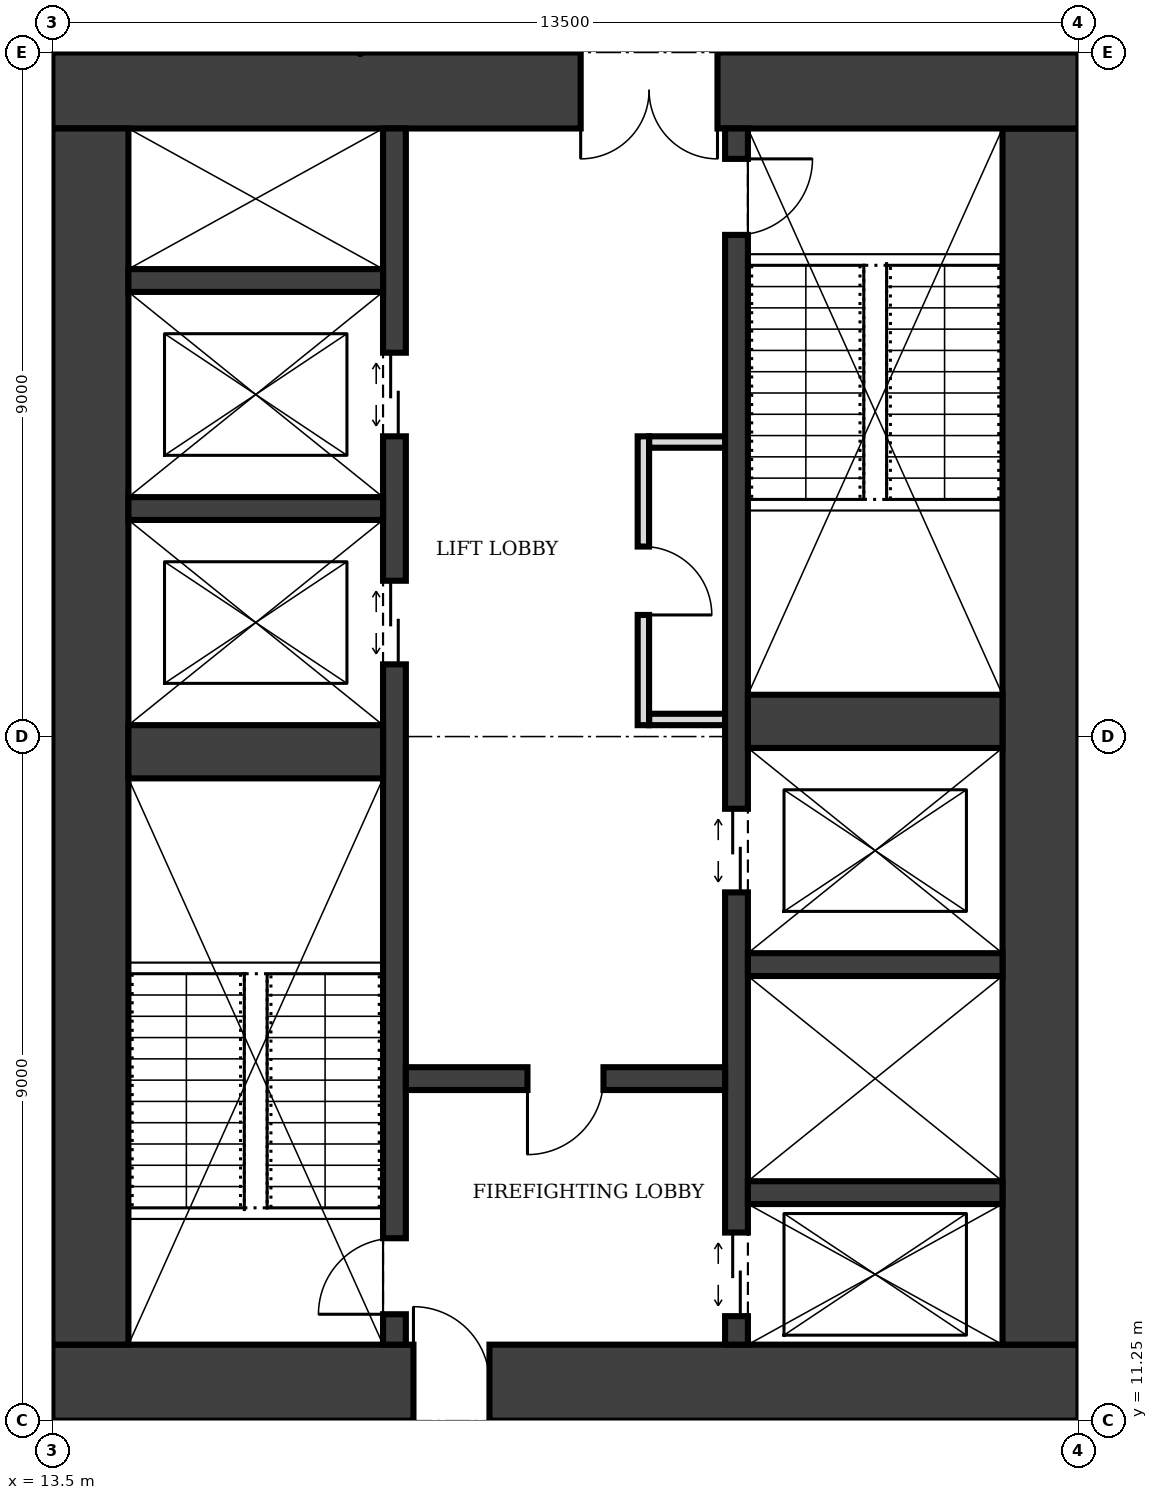
"""IFC4 building model, lengths in metres.
Left out: names, types, materials, properties, quantities, classifications, styles, units other than length and angle.
Written with IfcOpenShell. Run it as: python <this file> out.ifc"""

import sys

from ifc_helpers import new_model, si_unit, direction, frame, frame_2d, origin, place, context, subcontext, project, spatial, rectangle, extrude, element, fill, save


model = new_model("IFC4")
c1 = context("Model", 3, precision=1e-05, world=origin(), true_north=direction((0.0, 1.0)))
c2 = subcontext(c1, "Body", "Model", "MODEL_VIEW")
j1 = project(units=[si_unit("LENGTHUNIT", "METRE"), si_unit("PLANEANGLEUNIT", "RADIAN")], contexts=[c1])
p1 = place(None, origin())
s1 = spatial("IfcSite", under=j1, at=p1, CompositionType="ELEMENT")
p2 = place(p1, origin())
s2 = spatial("IfcBuilding", under=s1, at=p2, CompositionType="ELEMENT")
p3 = place(p2, frame((0.0, 0.0, 69.0)))
s3 = spatial("IfcBuildingStorey", under=s2, at=p3, CompositionType="ELEMENT", Elevation=69.0)
p4 = place(p3, frame((13.5, 11.75, 0.0), z_axis=(0.0, 0.0, 1.0), x_axis=(1.0, 0.0, 0.0)))
e1 = element("IfcWall", 1, at=p4, inside=s3, PredefinedType="SHEAR", context=c2, shape_type="SweptSolid", body=[
    extrude(rectangle(XDim=13.5, YDim=1.0, at=frame_2d((6.75, 0.0))), origin(), (0.0, 0.0, 1.0), 4.0),
])
p5 = place(p4, frame((4.75, 0.0, 0.0)))
e2 = element("IfcOpeningElement", 2, at=p5, cuts=e1, PredefinedType="OPENING", context=c2, shape_type="SweptSolid", body=[
    extrude(rectangle(XDim=1.0, YDim=2.1, at=frame_2d((0.5, 1.05))), frame((0.0, 0.51, 0.0), z_axis=(0.0, -1.0, 0.0), x_axis=(1.0, 0.0, 0.0)), (0.0, 0.0, 1.0), 1.02),
])
p6 = place(p3, frame((26.5, 12.25, 0.0), z_axis=(0.0, 0.0, 1.0), x_axis=(0.0, 1.0, 0.0)))
e3 = element("IfcWall", 3, at=p6, inside=s3, PredefinedType="SHEAR", context=c2, shape_type="SweptSolid", body=[
    extrude(rectangle(XDim=16.0, YDim=1.0, at=frame_2d((8.0, 0.0))), origin(), (0.0, 0.0, 1.0), 4.0),
])
p7 = place(p3, frame((27.0, 28.75, 0.0), z_axis=(0.0, 0.0, 1.0), x_axis=(-1.0, 0.0, 0.0)))
e4 = element("IfcWall", 4, at=p7, inside=s3, PredefinedType="SHEAR", context=c2, shape_type="SweptSolid", body=[
    extrude(rectangle(XDim=13.5, YDim=1.0, at=frame_2d((6.75, 0.0))), origin(), (0.0, 0.0, 1.0), 4.0),
])
p8 = place(p7, frame((4.75, 0.0, 0.0)))
e5 = element("IfcOpeningElement", 5, at=p8, cuts=e4, PredefinedType="OPENING", context=c2, shape_type="SweptSolid", body=[
    extrude(rectangle(XDim=1.8, YDim=2.1, at=frame_2d((0.9, 1.05))), frame((0.0, 0.51, 0.0), z_axis=(0.0, -1.0, 0.0), x_axis=(1.0, 0.0, 0.0)), (0.0, 0.0, 1.0), 1.02),
])
p9 = place(p3, frame((14.0, 28.25, 0.0), z_axis=(0.0, 0.0, 1.0), x_axis=(0.0, -1.0, 0.0)))
e6 = element("IfcWall", 6, at=p9, inside=s3, PredefinedType="SHEAR", context=c2, shape_type="SweptSolid", body=[
    extrude(rectangle(XDim=16.0, YDim=1.0, at=frame_2d((8.0, 0.0))), origin(), (0.0, 0.0, 1.0), 4.0),
])
p10 = place(p3, frame((18.0, 12.25, 0.0), z_axis=(0.0, 0.0, 1.0), x_axis=(0.0, 1.0, 0.0)))
e7 = element("IfcWall", 7, at=p10, inside=s3, PredefinedType="SHEAR", context=c2, shape_type="SweptSolid", body=[
    extrude(rectangle(XDim=16.0, YDim=0.3, at=frame_2d((8.0, 0.0))), origin(), (0.0, 0.0, 1.0), 4.0),
])
p11 = place(p10, frame((0.4, 0.0, 0.0)))
e8 = element("IfcOpeningElement", 8, at=p11, cuts=e7, PredefinedType="OPENING", context=c2, shape_type="SweptSolid", body=[
    extrude(rectangle(XDim=1.0, YDim=2.1, at=frame_2d((0.5, 1.05))), frame((0.0, 0.16, 0.0), z_axis=(0.0, -1.0, 0.0), x_axis=(1.0, 0.0, 0.0)), (0.0, 0.0, 1.0), 0.32),
])
p12 = place(p10, frame((8.95, 0.0, 0.0)))
e9 = element("IfcOpeningElement", 9, at=p12, cuts=e7, PredefinedType="OPENING", context=c2, shape_type="SweptSolid", body=[
    extrude(rectangle(XDim=1.1, YDim=2.1, at=frame_2d((0.55, 1.05))), frame((0.0, 0.16, 0.0), z_axis=(0.0, -1.0, 0.0), x_axis=(1.0, 0.0, 0.0)), (0.0, 0.0, 1.0), 0.32),
])
p13 = place(p10, frame((11.95, 0.0, 0.0)))
e10 = element("IfcOpeningElement", 10, at=p13, cuts=e7, PredefinedType="OPENING", context=c2, shape_type="SweptSolid", body=[
    extrude(rectangle(XDim=1.1, YDim=2.1, at=frame_2d((0.55, 1.05))), frame((0.0, 0.16, 0.0), z_axis=(0.0, -1.0, 0.0), x_axis=(1.0, 0.0, 0.0)), (0.0, 0.0, 1.0), 0.32),
])
p14 = place(p3, frame((22.5, 12.25, 0.0), z_axis=(0.0, 0.0, 1.0), x_axis=(0.0, 1.0, 0.0)))
e11 = element("IfcWall", 11, at=p14, inside=s3, PredefinedType="SHEAR", context=c2, shape_type="SweptSolid", body=[
    extrude(rectangle(XDim=16.0, YDim=0.3, at=frame_2d((8.0, 0.0))), origin(), (0.0, 0.0, 1.0), 4.0),
])
p15 = place(p14, frame((14.6, 0.0, 0.0)))
e12 = element("IfcOpeningElement", 12, at=p15, cuts=e11, PredefinedType="OPENING", context=c2, shape_type="SweptSolid", body=[
    extrude(rectangle(XDim=1.0, YDim=2.1, at=frame_2d((0.5, 1.05))), frame((0.0, 0.16, 0.0), z_axis=(0.0, -1.0, 0.0), x_axis=(1.0, 0.0, 0.0)), (0.0, 0.0, 1.0), 0.32),
])
p16 = place(p14, frame((0.375, 0.0, 0.0)))
e13 = element("IfcOpeningElement", 13, at=p16, cuts=e11, PredefinedType="OPENING", context=c2, shape_type="SweptSolid", body=[
    extrude(rectangle(XDim=1.1, YDim=2.1, at=frame_2d((0.55, 1.05))), frame((0.0, 0.16, 0.0), z_axis=(0.0, -1.0, 0.0), x_axis=(1.0, 0.0, 0.0)), (0.0, 0.0, 1.0), 0.32),
])
p17 = place(p14, frame((5.95, 0.0, 0.0)))
e14 = element("IfcOpeningElement", 14, at=p17, cuts=e11, PredefinedType="OPENING", context=c2, shape_type="SweptSolid", body=[
    extrude(rectangle(XDim=1.1, YDim=2.1, at=frame_2d((0.55, 1.05))), frame((0.0, 0.16, 0.0), z_axis=(0.0, -1.0, 0.0), x_axis=(1.0, 0.0, 0.0)), (0.0, 0.0, 1.0), 0.32),
])
p18 = place(p3, frame((14.5, 20.05, 0.0), z_axis=(0.0, 0.0, 1.0), x_axis=(1.0, 0.0, 0.0)))
e15 = element("IfcWall", 15, at=p18, inside=s3, PredefinedType="SHEAR", context=c2, shape_type="SweptSolid", body=[
    extrude(rectangle(XDim=3.35, YDim=0.7, at=frame_2d((1.675, 0.0))), origin(), (0.0, 0.0, 1.0), 4.0),
])
p19 = place(p3, frame((18.15, 15.75, 0.0), z_axis=(0.0, 0.0, 1.0), x_axis=(1.0, 0.0, 0.0)))
e16 = element("IfcWall", 16, at=p19, inside=s3, PredefinedType="SHEAR", context=c2, shape_type="SweptSolid", body=[
    extrude(rectangle(XDim=4.2, YDim=0.3, at=frame_2d((2.1, 0.0))), origin(), (0.0, 0.0, 1.0), 4.0),
])
p20 = place(p19, frame((1.6, 0.0, 0.0)))
e17 = element("IfcOpeningElement", 17, at=p20, cuts=e16, PredefinedType="OPENING", context=c2, shape_type="SweptSolid", body=[
    extrude(rectangle(XDim=1.0, YDim=2.1, at=frame_2d((0.5, 1.05))), frame((0.0, 0.16, 0.0), z_axis=(0.0, -1.0, 0.0), x_axis=(1.0, 0.0, 0.0)), (0.0, 0.0, 1.0), 0.32),
])
for number, where, z_axis, x_axis in (
    (18, (22.65, 14.25, 0.0), (0.0, 0.0, 1.0), (1.0, 0.0, 0.0)),
    (19, (22.65, 17.25, 0.0), (0.0, 0.0, 1.0), (1.0, 0.0, 0.0)),
):
    element("IfcWall", number, at=place(p3, frame(where, z_axis=z_axis, x_axis=x_axis)), inside=s3, PredefinedType="SHEAR", context=c2, shape_type="SweptSolid", body=[
        extrude(rectangle(XDim=3.35, YDim=0.3, at=frame_2d((1.675, 0.0))), origin(), (0.0, 0.0, 1.0), 4.0),
    ])
p21 = place(p3, frame((22.65, 20.45, 0.0), z_axis=(0.0, 0.0, 1.0), x_axis=(1.0, 0.0, 0.0)))
e20 = element("IfcWall", 20, at=p21, inside=s3, PredefinedType="SHEAR", context=c2, shape_type="SweptSolid", body=[
    extrude(rectangle(XDim=3.35, YDim=0.7, at=frame_2d((1.675, 0.0))), origin(), (0.0, 0.0, 1.0), 4.0),
])
for number, where, z_axis, x_axis in (
    (21, (14.5, 23.25, 0.0), (0.0, 0.0, 1.0), (1.0, 0.0, 0.0)),
    (22, (14.5, 26.25, 0.0), (0.0, 0.0, 1.0), (1.0, 0.0, 0.0)),
):
    element("IfcWall", number, at=place(p3, frame(where, z_axis=z_axis, x_axis=x_axis)), inside=s3, PredefinedType="SHEAR", context=c2, shape_type="SweptSolid", body=[
        extrude(rectangle(XDim=3.35, YDim=0.3, at=frame_2d((1.675, 0.0))), origin(), (0.0, 0.0, 1.0), 4.0),
    ])
p22 = place(p3, frame((21.275, 20.4, 0.0), z_axis=(0.0, 0.0, 1.0), x_axis=(0.0, 1.0, 0.0)))
e23 = element("IfcWall", 23, at=p22, inside=s3, PredefinedType="PARTITIONING", context=c2, shape_type="SweptSolid", body=[
    extrude(rectangle(XDim=3.8, YDim=0.15, at=frame_2d((1.9, 0.0))), origin(), (0.0, 0.0, 1.0), 3.75),
])
p23 = place(p22, frame((1.45, 0.0, 0.0)))
e24 = element("IfcOpeningElement", 24, at=p23, cuts=e23, PredefinedType="OPENING", context=c2, shape_type="SweptSolid", body=[
    extrude(rectangle(XDim=0.9, YDim=2.1, at=frame_2d((0.45, 1.05))), frame((0.0, 0.085, 0.0), z_axis=(0.0, -1.0, 0.0), x_axis=(1.0, 0.0, 0.0)), (0.0, 0.0, 1.0), 0.17),
])
for number, where, z_axis, x_axis in (
    (25, (21.35, 20.475, 0.0), (0.0, 0.0, 1.0), (1.0, 0.0, 0.0)),
    (26, (21.35, 24.125, 0.0), (0.0, 0.0, 1.0), (1.0, 0.0, 0.0)),
):
    element("IfcWall", number, at=place(p3, frame(where, z_axis=z_axis, x_axis=x_axis)), inside=s3, PredefinedType="PARTITIONING", context=c2, shape_type="SweptSolid", body=[
        extrude(rectangle(XDim=1.0, YDim=0.15, at=frame_2d((0.5, 0.0))), origin(), (0.0, 0.0, 1.0), 3.75),
    ])
p24 = place(p5, origin())
e27 = element("IfcDoor", 27, at=p24, inside=s3, OperationType="SINGLE_SWING_LEFT", PredefinedType="DOOR", context=c2, shape_type="SweptSolid", body=[
    extrude(rectangle(XDim=1.0, YDim=2.1, at=frame_2d((0.5, 1.05))), frame((0.0, 0.025, 0.0), z_axis=(0.0, -1.0, 0.0), x_axis=(1.0, 0.0, 0.0)), (0.0, 0.0, 1.0), 0.05),
])
fill(e2, e27)
p25 = place(p8, origin())
e28 = element("IfcDoor", 28, at=p25, inside=s3, OperationType="DOUBLE_DOOR_SINGLE_SWING", PredefinedType="DOOR", context=c2, shape_type="SweptSolid", body=[
    extrude(rectangle(XDim=1.8, YDim=2.1, at=frame_2d((0.9, 1.05))), frame((0.0, 0.025, 0.0), z_axis=(0.0, -1.0, 0.0), x_axis=(1.0, 0.0, 0.0)), (0.0, 0.0, 1.0), 0.05),
])
fill(e5, e28)
p26 = place(p20, frame((1.0, 0.0, 0.0), z_axis=(0.0, 0.0, 1.0), x_axis=(-1.0, 0.0, 0.0)))
e29 = element("IfcDoor", 29, at=p26, inside=s3, OperationType="SINGLE_SWING_RIGHT", PredefinedType="DOOR", context=c2, shape_type="SweptSolid", body=[
    extrude(rectangle(XDim=1.0, YDim=2.1, at=frame_2d((0.5, 1.05))), frame((0.0, 0.025, 0.0), z_axis=(0.0, -1.0, 0.0), x_axis=(1.0, 0.0, 0.0)), (0.0, 0.0, 1.0), 0.05),
])
fill(e17, e29)
p27 = place(p11, origin())
e30 = element("IfcDoor", 30, at=p27, inside=s3, OperationType="SINGLE_SWING_LEFT", PredefinedType="DOOR", context=c2, shape_type="SweptSolid", body=[
    extrude(rectangle(XDim=1.0, YDim=2.1, at=frame_2d((0.5, 1.05))), frame((0.0, 0.025, 0.0), z_axis=(0.0, -1.0, 0.0), x_axis=(1.0, 0.0, 0.0)), (0.0, 0.0, 1.0), 0.05),
])
fill(e8, e30)
p28 = place(p15, frame((1.0, 0.0, 0.0), z_axis=(0.0, 0.0, 1.0), x_axis=(-1.0, 0.0, 0.0)))
e31 = element("IfcDoor", 31, at=p28, inside=s3, OperationType="SINGLE_SWING_LEFT", PredefinedType="DOOR", context=c2, shape_type="SweptSolid", body=[
    extrude(rectangle(XDim=1.0, YDim=2.1, at=frame_2d((0.5, 1.05))), frame((0.0, 0.025, 0.0), z_axis=(0.0, -1.0, 0.0), x_axis=(1.0, 0.0, 0.0)), (0.0, 0.0, 1.0), 0.05),
])
fill(e12, e31)
p29 = place(p16, origin())
e32 = element("IfcDoor", 32, at=p29, inside=s3, OperationType="DOUBLE_DOOR_SLIDING", PredefinedType="DOOR", context=c2, shape_type="SweptSolid", body=[
    extrude(rectangle(XDim=1.1, YDim=2.1, at=frame_2d((0.55, 1.05))), frame((0.0, 0.025, 0.0), z_axis=(0.0, -1.0, 0.0), x_axis=(1.0, 0.0, 0.0)), (0.0, 0.0, 1.0), 0.05),
])
fill(e13, e32)
p30 = place(p12, origin())
e33 = element("IfcDoor", 33, at=p30, inside=s3, OperationType="DOUBLE_DOOR_SLIDING", PredefinedType="DOOR", context=c2, shape_type="SweptSolid", body=[
    extrude(rectangle(XDim=1.1, YDim=2.1, at=frame_2d((0.55, 1.05))), frame((0.0, 0.025, 0.0), z_axis=(0.0, -1.0, 0.0), x_axis=(1.0, 0.0, 0.0)), (0.0, 0.0, 1.0), 0.05),
])
fill(e9, e33)
p31 = place(p13, origin())
e34 = element("IfcDoor", 34, at=p31, inside=s3, OperationType="DOUBLE_DOOR_SLIDING", PredefinedType="DOOR", context=c2, shape_type="SweptSolid", body=[
    extrude(rectangle(XDim=1.1, YDim=2.1, at=frame_2d((0.55, 1.05))), frame((0.0, 0.025, 0.0), z_axis=(0.0, -1.0, 0.0), x_axis=(1.0, 0.0, 0.0)), (0.0, 0.0, 1.0), 0.05),
])
fill(e10, e34)
p32 = place(p17, origin())
e35 = element("IfcDoor", 35, at=p32, inside=s3, OperationType="DOUBLE_DOOR_SLIDING", PredefinedType="DOOR", context=c2, shape_type="SweptSolid", body=[
    extrude(rectangle(XDim=1.1, YDim=2.1, at=frame_2d((0.55, 1.05))), frame((0.0, 0.025, 0.0), z_axis=(0.0, -1.0, 0.0), x_axis=(1.0, 0.0, 0.0)), (0.0, 0.0, 1.0), 0.05),
])
fill(e14, e35)
p33 = place(p23, frame((0.9, 0.0, 0.0), z_axis=(0.0, 0.0, 1.0), x_axis=(-1.0, 0.0, 0.0)))
e36 = element("IfcDoor", 36, at=p33, inside=s3, OperationType="SINGLE_SWING_RIGHT", PredefinedType="DOOR", context=c2, shape_type="SweptSolid", body=[
    extrude(rectangle(XDim=0.9, YDim=2.1, at=frame_2d((0.45, 1.05))), frame((0.0, 0.025, 0.0), z_axis=(0.0, -1.0, 0.0), x_axis=(1.0, 0.0, 0.0)), (0.0, 0.0, 1.0), 0.05),
])
fill(e24, e36)
save(model, sys.argv[1])
